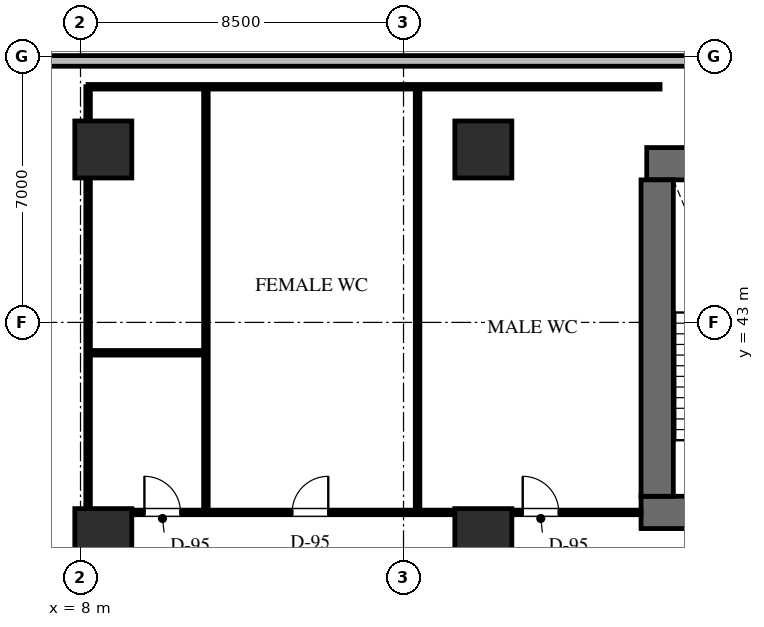
"""IFC4 building model, lengths in metres.
Left out: names, types, materials, properties, quantities, classifications, styles, units other than length and angle.
Written with IfcOpenShell. Run it as: python <this file> out.ifc"""

import sys

from ifc_helpers import new_model, si_unit, direction, frame, frame_2d, origin, origin_2d, place, context, subcontext, project, spatial, rectangle, extrude, element, fill, save


model = new_model("IFC4")
c1 = context("Model", 3, precision=1e-05, world=origin(), true_north=direction((0.0, 1.0)))
c2 = subcontext(c1, "Body", "Model", "MODEL_VIEW")
j1 = project(units=[si_unit("LENGTHUNIT", "METRE"), si_unit("PLANEANGLEUNIT", "RADIAN")], contexts=[c1])
p1 = place(None, origin())
s1 = spatial("IfcSite", under=j1, at=p1, CompositionType="ELEMENT")
p2 = place(p1, origin())
s2 = spatial("IfcBuilding", under=s1, at=p2, CompositionType="ELEMENT")
p3 = place(p2, frame((0.0, 0.0, 10.8)))
s3 = spatial("IfcBuildingStorey", under=s2, at=p3, CompositionType="ELEMENT", Elevation=10.8)
p4 = place(p3, frame((22.9, 47.175, 0.0), z_axis=(0.0, 0.0, 1.0), x_axis=(1.0, 0.0, 0.0)))
e1 = element("IfcWall", 1, at=p4, inside=s3, PredefinedType="SHEAR", context=c2, shape_type="SweptSolid", body=[
    extrude(rectangle(XDim=43.8, YDim=0.85, at=frame_2d((21.9, 0.0))), origin(), (0.0, 0.0, 1.0), 4.5),
])
p5 = place(p3, frame((22.75, 38.0, 0.0), z_axis=(0.0, 0.0, 1.0), x_axis=(1.0, 0.0, 0.0)))
e2 = element("IfcWall", 2, at=p5, inside=s3, PredefinedType="SHEAR", context=c2, shape_type="SweptSolid", body=[
    extrude(rectangle(XDim=4.3, YDim=0.85, at=frame_2d((2.15, 0.0))), origin(), (0.0, 0.0, 1.0), 4.5),
])
p6 = place(p5, frame((1.7, 0.0, 0.0)))
e3 = element("IfcOpeningElement", 3, at=p6, cuts=e2, PredefinedType="OPENING", context=c2, shape_type="SweptSolid", body=[
    extrude(rectangle(XDim=1.1, YDim=2.2, at=frame_2d((0.55, 1.1))), frame((0.0, 0.435, 0.0), z_axis=(0.0, -1.0, 0.0), x_axis=(1.0, 0.0, 0.0)), (0.0, 0.0, 1.0), 0.87),
])
p7 = place(p3, frame((23.175, 38.425, 0.0), z_axis=(0.0, 0.0, 1.0), x_axis=(0.0, 1.0, 0.0)))
e4 = element("IfcWall", 4, at=p7, inside=s3, PredefinedType="SHEAR", context=c2, shape_type="SweptSolid", body=[
    extrude(rectangle(XDim=8.325, YDim=0.85, at=frame_2d((4.163, 0.0))), origin(), (0.0, 0.0, 1.0), 4.5),
])
for number, where, z_axis, x_axis in (
    (5, (18.6, 37.35, 0.0), (0.0, 0.0, 1.0), (1.0, 0.0, 0.0)),
    (6, (18.6, 47.55, 0.0), (0.0, 0.0, 1.0), (1.0, 0.0, 0.0)),
    (7, (8.6, 37.35, 0.0), (0.0, 0.0, 1.0), (1.0, 0.0, 0.0)),
    (8, (8.6, 47.55, 0.0), (0.0, 0.0, 1.0), (1.0, 0.0, 0.0)),
):
    element("IfcColumn", number, at=place(p3, frame(where, z_axis=z_axis, x_axis=x_axis)), inside=s3, PredefinedType="COLUMN", context=c2, shape_type="SweptSolid", body=[
        extrude(rectangle(XDim=1.5, YDim=1.5, at=origin_2d()), origin(), (0.0, 0.0, 1.0), 4.5),
    ])
p8 = place(p3, frame((2.65, 49.88, 0.0), z_axis=(0.0, 0.0, 1.0), x_axis=(1.0, 0.0, 0.0)))
e9 = element("IfcWall", 9, at=p8, inside=s3, PredefinedType="STANDARD", context=c2, shape_type="SweptSolid", body=[
    extrude(rectangle(XDim=68.701, YDim=0.28, at=frame_2d((34.35, 0.0))), origin(), (0.0, 0.0, 1.0), 4.23),
])
p9 = place(p3, frame((8.2, 38.0, 0.0), z_axis=(0.0, 0.0, 1.0), x_axis=(1.0, 0.0, 0.0)))
e10 = element("IfcWall", 10, at=p9, inside=s3, PredefinedType="PARTITIONING", context=c2, shape_type="SweptSolid", body=[
    extrude(rectangle(XDim=14.55, YDim=0.12, at=frame_2d((7.275, 0.0))), origin(), (0.0, 0.0, 1.0), 3.282),
])
p10 = place(p9, frame((1.482, 0.0, 0.0)))
e11 = element("IfcOpeningElement", 11, at=p10, cuts=e10, PredefinedType="OPENING", context=c2, shape_type="SweptSolid", body=[
    extrude(rectangle(XDim=0.95, YDim=2.15, at=frame_2d((0.475, 1.075))), frame((0.0, 0.07, 0.0), z_axis=(0.0, -1.0, 0.0), x_axis=(1.0, 0.0, 0.0)), (0.0, 0.0, 1.0), 0.14),
])
p11 = place(p9, frame((5.37, 0.0, 0.0)))
e12 = element("IfcOpeningElement", 12, at=p11, cuts=e10, PredefinedType="OPENING", context=c2, shape_type="SweptSolid", body=[
    extrude(rectangle(XDim=0.95, YDim=2.15, at=frame_2d((0.475, 1.075))), frame((0.0, 0.07, 0.0), z_axis=(0.0, -1.0, 0.0), x_axis=(1.0, 0.0, 0.0)), (0.0, 0.0, 1.0), 0.14),
])
p12 = place(p9, frame((11.437, 0.0, 0.0)))
e13 = element("IfcOpeningElement", 13, at=p12, cuts=e10, PredefinedType="OPENING", context=c2, shape_type="SweptSolid", body=[
    extrude(rectangle(XDim=0.95, YDim=2.15, at=frame_2d((0.475, 1.075))), frame((0.0, 0.07, 0.0), z_axis=(0.0, -1.0, 0.0), x_axis=(1.0, 0.0, 0.0)), (0.0, 0.0, 1.0), 0.14),
])
p13 = place(p3, frame((8.2, 38.0, 0.0), z_axis=(0.0, 0.0, 1.0), x_axis=(0.0, 1.0, 0.0)))
e14 = element("IfcWall", 14, at=p13, inside=s3, PredefinedType="PARTITIONING", context=c2, shape_type="SweptSolid", body=[
    extrude(rectangle(XDim=11.2, YDim=0.12, at=frame_2d((5.6, 0.0))), origin(), (0.0, 0.0, 1.0), 4.23),
])
p14 = place(p3, frame((8.2, 49.2, 0.0), z_axis=(0.0, 0.0, 1.0), x_axis=(1.0, 0.0, 0.0)))
e15 = element("IfcWall", 15, at=p14, inside=s3, PredefinedType="PARTITIONING", context=c2, shape_type="SweptSolid", body=[
    extrude(rectangle(XDim=15.05, YDim=0.12, at=frame_2d((7.525, 0.0))), origin(), (0.0, 0.0, 1.0), 4.23),
])
for number, where, z_axis, x_axis in (
    (16, (11.3, 38.068, 0.0), (0.0, 0.0, 1.0), (0.0, 1.0, 0.0)),
    (17, (16.87, 38.068, 0.0), (0.0, 0.0, 1.0), (0.0, 1.0, 0.0)),
):
    element("IfcWall", number, at=place(p3, frame(where, z_axis=z_axis, x_axis=x_axis)), inside=s3, PredefinedType="PARTITIONING", context=c2, shape_type="SweptSolid", body=[
        extrude(rectangle(XDim=11.064, YDim=0.12, at=frame_2d((5.532, 0.0))), origin(), (0.0, 0.0, 1.0), 3.282),
    ])
p15 = place(p3, frame((8.268, 42.2, 0.0), z_axis=(0.0, 0.0, 1.0), x_axis=(1.0, 0.0, 0.0)))
e18 = element("IfcWall", 18, at=p15, inside=s3, PredefinedType="PARTITIONING", context=c2, shape_type="SweptSolid", body=[
    extrude(rectangle(XDim=2.964, YDim=0.12, at=frame_2d((1.482, 0.0))), origin(), (0.0, 0.0, 1.0), 3.282),
])
p16 = place(p10, origin())
e19 = element("IfcDoor", 19, at=p16, inside=s3, OperationType="SINGLE_SWING_LEFT", PredefinedType="DOOR", context=c2, shape_type="SweptSolid", body=[
    extrude(rectangle(XDim=0.95, YDim=2.15, at=frame_2d((0.475, 1.075))), frame((0.0, 0.025, 0.0), z_axis=(0.0, -1.0, 0.0), x_axis=(1.0, 0.0, 0.0)), (0.0, 0.0, 1.0), 0.05),
])
fill(e11, e19)
p17 = place(p11, origin())
e20 = element("IfcDoor", 20, at=p17, inside=s3, OperationType="SINGLE_SWING_RIGHT", PredefinedType="DOOR", context=c2, shape_type="SweptSolid", body=[
    extrude(rectangle(XDim=0.95, YDim=2.15, at=frame_2d((0.475, 1.075))), frame((0.0, 0.025, 0.0), z_axis=(0.0, -1.0, 0.0), x_axis=(1.0, 0.0, 0.0)), (0.0, 0.0, 1.0), 0.05),
])
fill(e12, e20)
p18 = place(p12, origin())
e21 = element("IfcDoor", 21, at=p18, inside=s3, OperationType="SINGLE_SWING_LEFT", PredefinedType="DOOR", context=c2, shape_type="SweptSolid", body=[
    extrude(rectangle(XDim=0.95, YDim=2.15, at=frame_2d((0.475, 1.075))), frame((0.0, 0.025, 0.0), z_axis=(0.0, -1.0, 0.0), x_axis=(1.0, 0.0, 0.0)), (0.0, 0.0, 1.0), 0.05),
])
fill(e13, e21)
save(model, sys.argv[1])
